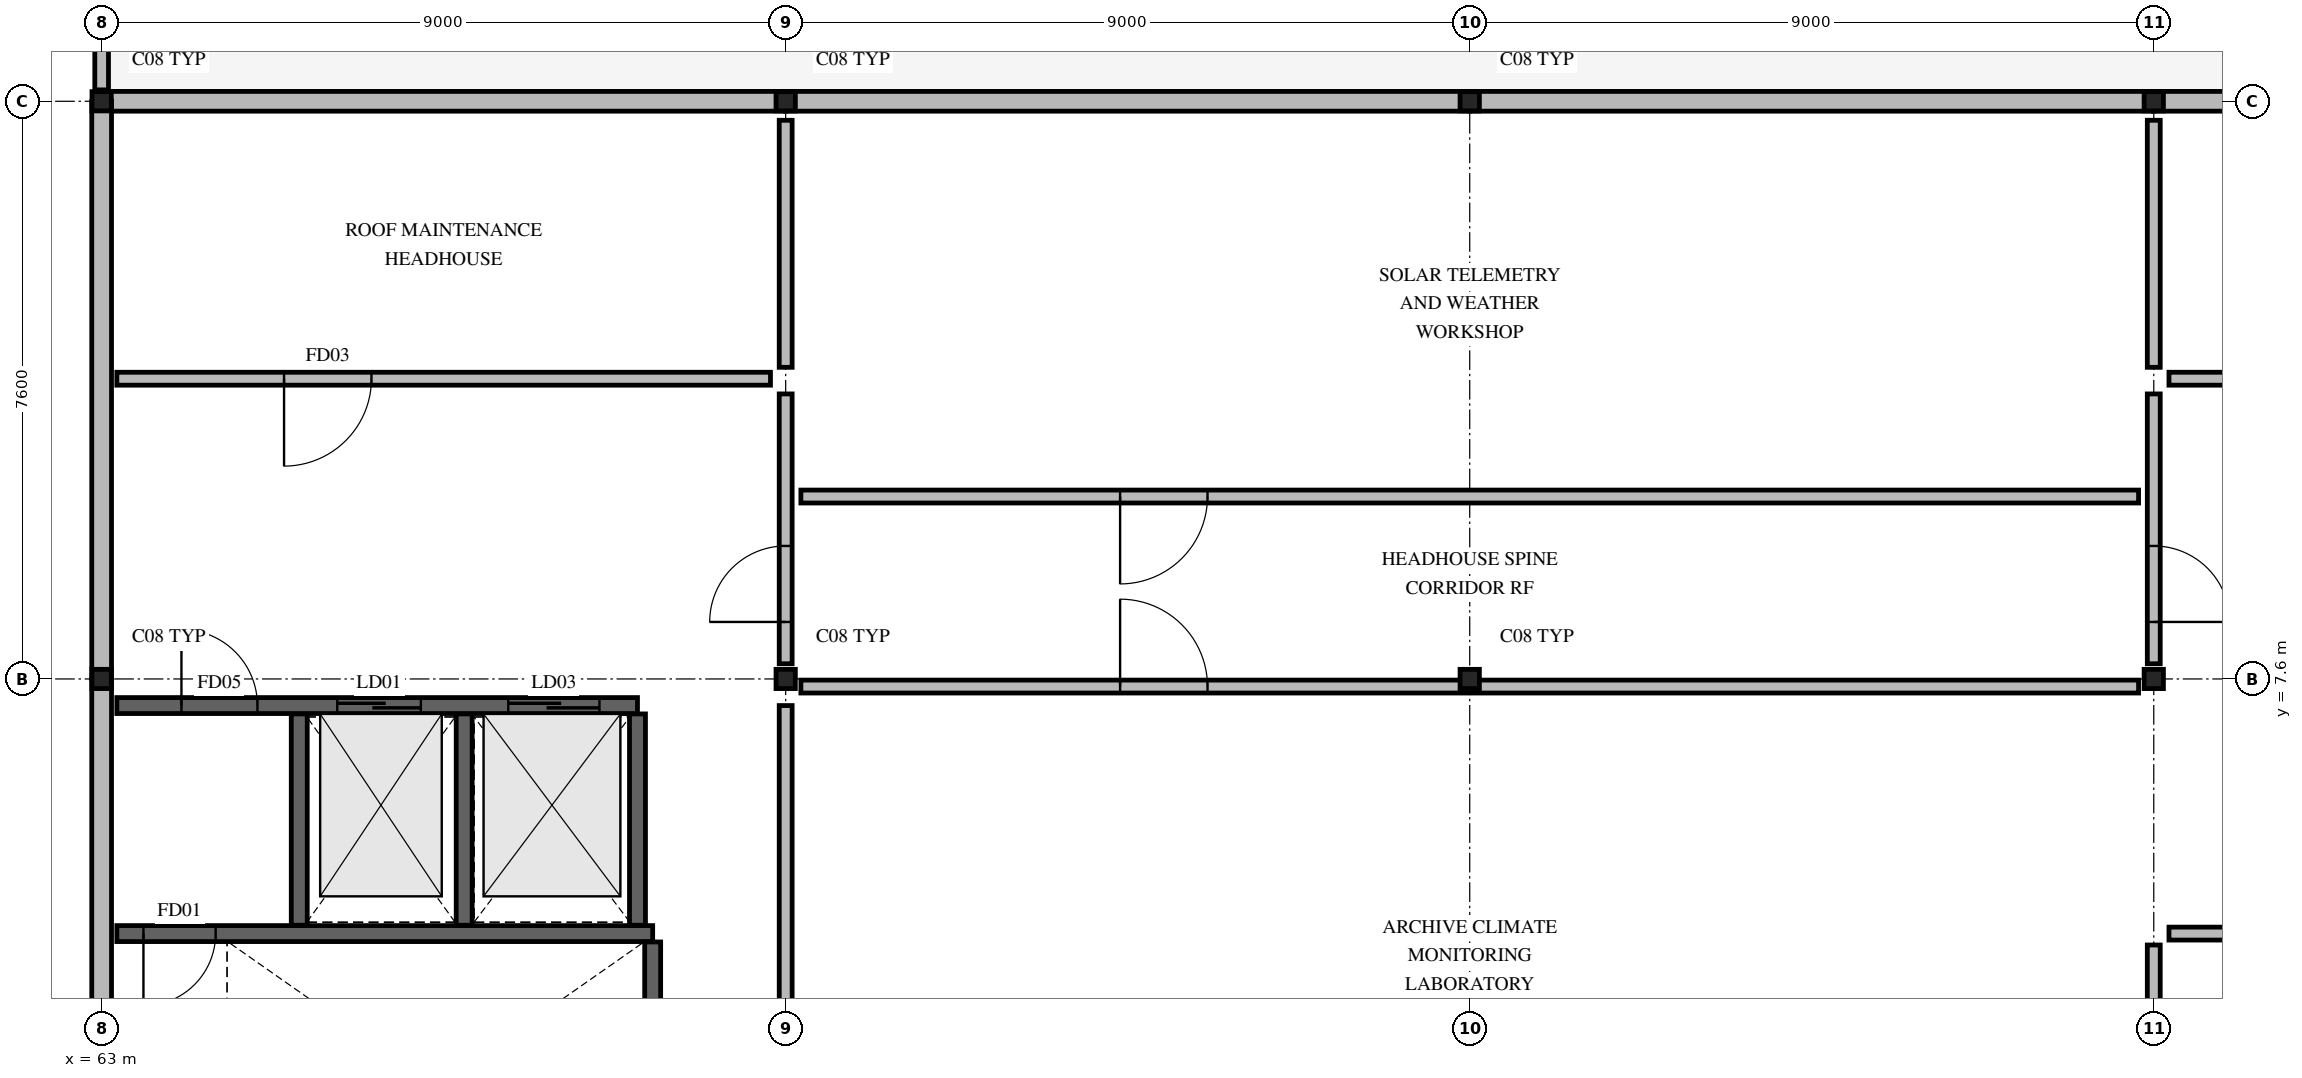
"""IFC4 building model, lengths in metres.
Left out: names, types, materials, properties, quantities, classifications, styles, units other than length and angle.
Written with IfcOpenShell. Run it as: python <this file> out.ifc"""

import sys

from ifc_helpers import new_model, si_unit, direction, frame, frame_2d, origin, origin_2d, place, context, subcontext, project, spatial, rectangle, i_section, extrude, element, fill, save


model = new_model("IFC4")
c1 = context("Model", 3, precision=1e-05, world=origin(), true_north=direction((0.0, 1.0)))
c2 = subcontext(c1, "Body", "Model", "MODEL_VIEW")
j1 = project(units=[si_unit("LENGTHUNIT", "METRE"), si_unit("PLANEANGLEUNIT", "RADIAN")], contexts=[c1])
p1 = place(None, origin())
s1 = spatial("IfcSite", under=j1, at=p1, CompositionType="ELEMENT")
p2 = place(p1, origin())
s2 = spatial("IfcBuilding", under=s1, at=p2, CompositionType="ELEMENT")
p3 = place(p2, frame((0.0, 0.0, 26.64)))
s3 = spatial("IfcBuildingStorey", under=s2, at=p3, CompositionType="ELEMENT", Elevation=26.64)
p4 = place(p3, frame((63.0, 7.6, 0.0), z_axis=(0.0, 0.0, 1.0), x_axis=(1.0, 0.0, 0.0)))
e1 = element("IfcColumn", 1, at=p4, inside=s3, PredefinedType="COLUMN", context=c2, shape_type="SweptSolid", body=[
    extrude(i_section(OverallWidth=0.254, OverallDepth=0.253, WebThickness=0.009, FlangeThickness=0.014, FilletRadius=0.012, at=origin_2d()), origin(), (0.0, 0.0, 1.0), 3.54),
])
p5 = place(p3, frame((63.0, 15.2, 0.0), z_axis=(0.0, 0.0, 1.0), x_axis=(1.0, 0.0, 0.0)))
e2 = element("IfcColumn", 2, at=p5, inside=s3, PredefinedType="COLUMN", context=c2, shape_type="SweptSolid", body=[
    extrude(i_section(OverallWidth=0.254, OverallDepth=0.253, WebThickness=0.009, FlangeThickness=0.014, FilletRadius=0.012, at=origin_2d()), origin(), (0.0, 0.0, 1.0), 4.14),
])
p6 = place(p3, frame((72.0, 7.6, 0.0), z_axis=(0.0, 0.0, 1.0), x_axis=(1.0, 0.0, 0.0)))
e3 = element("IfcColumn", 3, at=p6, inside=s3, PredefinedType="COLUMN", context=c2, shape_type="SweptSolid", body=[
    extrude(i_section(OverallWidth=0.254, OverallDepth=0.253, WebThickness=0.009, FlangeThickness=0.014, FilletRadius=0.012, at=origin_2d()), origin(), (0.0, 0.0, 1.0), 3.54),
])
p7 = place(p3, frame((72.0, 15.2, 0.0), z_axis=(0.0, 0.0, 1.0), x_axis=(1.0, 0.0, 0.0)))
e4 = element("IfcColumn", 4, at=p7, inside=s3, PredefinedType="COLUMN", context=c2, shape_type="SweptSolid", body=[
    extrude(i_section(OverallWidth=0.254, OverallDepth=0.253, WebThickness=0.009, FlangeThickness=0.014, FilletRadius=0.012, at=origin_2d()), origin(), (0.0, 0.0, 1.0), 4.14),
])
p8 = place(p3, frame((81.0, 7.6, 0.0), z_axis=(0.0, 0.0, 1.0), x_axis=(1.0, 0.0, 0.0)))
e5 = element("IfcColumn", 5, at=p8, inside=s3, PredefinedType="COLUMN", context=c2, shape_type="SweptSolid", body=[
    extrude(i_section(OverallWidth=0.254, OverallDepth=0.253, WebThickness=0.009, FlangeThickness=0.014, FilletRadius=0.012, at=origin_2d()), origin(), (0.0, 0.0, 1.0), 3.54),
])
p9 = place(p3, frame((81.0, 15.2, 0.0), z_axis=(0.0, 0.0, 1.0), x_axis=(1.0, 0.0, 0.0)))
e6 = element("IfcColumn", 6, at=p9, inside=s3, PredefinedType="COLUMN", context=c2, shape_type="SweptSolid", body=[
    extrude(i_section(OverallWidth=0.254, OverallDepth=0.253, WebThickness=0.009, FlangeThickness=0.014, FilletRadius=0.012, at=origin_2d()), origin(), (0.0, 0.0, 1.0), 4.14),
])
p10 = place(p3, frame((90.0, 7.6, 0.0), z_axis=(0.0, 0.0, 1.0), x_axis=(1.0, 0.0, 0.0)))
e7 = element("IfcColumn", 7, at=p10, inside=s3, PredefinedType="COLUMN", context=c2, shape_type="SweptSolid", body=[
    extrude(i_section(OverallWidth=0.254, OverallDepth=0.253, WebThickness=0.009, FlangeThickness=0.014, FilletRadius=0.012, at=origin_2d()), origin(), (0.0, 0.0, 1.0), 3.54),
])
p11 = place(p3, frame((90.0, 15.2, 0.0), z_axis=(0.0, 0.0, 1.0), x_axis=(1.0, 0.0, 0.0)))
e8 = element("IfcColumn", 8, at=p11, inside=s3, PredefinedType="COLUMN", context=c2, shape_type="SweptSolid", body=[
    extrude(i_section(OverallWidth=0.254, OverallDepth=0.253, WebThickness=0.009, FlangeThickness=0.014, FilletRadius=0.012, at=origin_2d()), origin(), (0.0, 0.0, 1.0), 4.14),
])
for number, where, z_axis, x_axis in (
    (9, (99.0, 15.2, 0.0), (0.0, 0.0, 1.0), (-1.0, 0.0, 0.0)),
    (10, (90.0, 15.2, 0.0), (0.0, 0.0, 1.0), (-1.0, 0.0, 0.0)),
    (11, (81.0, 15.2, 0.0), (0.0, 0.0, 1.0), (-1.0, 0.0, 0.0)),
    (12, (72.0, 15.2, 0.0), (0.0, 0.0, 1.0), (-1.0, 0.0, 0.0)),
):
    element("IfcWall", number, at=place(p3, frame(where, z_axis=z_axis, x_axis=x_axis)), inside=s3, PredefinedType="STANDARD", context=c2, shape_type="SweptSolid", body=[
        extrude(rectangle(XDim=9.0, YDim=0.26, at=frame_2d((4.5, 0.0))), origin(), (0.0, 0.0, 1.0), 2.44),
    ])
p12 = place(p3, frame((63.0, 15.2, 0.0), z_axis=(0.0, 0.0, 1.0), x_axis=(0.0, -1.0, 0.0)))
e13 = element("IfcWall", 13, at=p12, inside=s3, PredefinedType="STANDARD", context=c2, shape_type="SweptSolid", body=[
    extrude(rectangle(XDim=7.6, YDim=0.26, at=frame_2d((3.8, 0.0))), origin(), (0.0, 0.0, 1.0), 2.44),
])
p13 = place(p3, frame((63.0, 7.6, 0.0), z_axis=(0.0, 0.0, 1.0), x_axis=(0.0, -1.0, 0.0)))
e14 = element("IfcWall", 14, at=p13, inside=s3, PredefinedType="STANDARD", context=c2, shape_type="SweptSolid", body=[
    extrude(rectangle(XDim=7.6, YDim=0.26, at=frame_2d((3.8, 0.0))), origin(), (0.0, 0.0, 1.0), 2.44),
])
p14 = place(p3, frame((63.0, 15.35, 0.0), z_axis=(0.0, 0.0, 1.0), x_axis=(0.0, 1.0, 0.0)))
e15 = element("IfcWall", 15, at=p14, inside=s3, PredefinedType="PARAPET", context=c2, shape_type="SweptSolid", body=[
    extrude(rectangle(XDim=7.45, YDim=0.18, at=frame_2d((3.725, 0.0))), origin(), (0.0, 0.0, 1.0), 1.05),
])
p15 = place(p3, frame((63.2, 4.25, 0.0), z_axis=(0.0, 0.0, 1.0), x_axis=(1.0, 0.0, 0.0)))
e16 = element("IfcWall", 16, at=p15, inside=s3, PredefinedType="SOLIDWALL", context=c2, shape_type="SweptSolid", body=[
    extrude(rectangle(XDim=7.05, YDim=0.21, at=frame_2d((3.525, 0.0))), origin(), (0.0, 0.0, 1.0), 2.44),
])
p16 = place(p15, frame((0.35, 0.0, 0.0)))
e17 = element("IfcOpeningElement", 17, at=p16, cuts=e16, PredefinedType="OPENING", context=c2, shape_type="SweptSolid", body=[
    extrude(rectangle(XDim=0.95, YDim=2.12, at=frame_2d((0.475, 1.06))), frame((0.0, 0.115, 0.0), z_axis=(0.0, -1.0, 0.0), x_axis=(1.0, 0.0, 0.0)), (0.0, 0.0, 1.0), 0.23),
])
p17 = place(p3, frame((70.25, 0.2, 0.0), z_axis=(0.0, 0.0, 1.0), x_axis=(0.0, 1.0, 0.0)))
e18 = element("IfcWall", 18, at=p17, inside=s3, PredefinedType="SOLIDWALL", context=c2, shape_type="SweptSolid", body=[
    extrude(rectangle(XDim=3.94, YDim=0.21, at=frame_2d((1.97, 0.0))), origin(), (0.0, 0.0, 1.0), 2.44),
])
for number, where, z_axis, x_axis in (
    (19, (65.6, 4.36, 0.0), (0.0, 0.0, 1.0), (0.0, 1.0, 0.0)),
    (20, (67.77, 4.36, 0.0), (0.0, 0.0, 1.0), (0.0, 1.0, 0.0)),
    (21, (70.05, 4.36, 0.0), (0.0, 0.0, 1.0), (0.0, 1.0, 0.0)),
):
    element("IfcWall", number, at=place(p3, frame(where, z_axis=z_axis, x_axis=x_axis)), inside=s3, PredefinedType="SOLIDWALL", context=c2, shape_type="SweptSolid", body=[
        extrude(rectangle(XDim=2.78, YDim=0.21, at=frame_2d((1.39, 0.0))), origin(), (0.0, 0.0, 1.0), 2.44),
    ])
p18 = place(p3, frame((63.2, 7.25, 0.0), z_axis=(0.0, 0.0, 1.0), x_axis=(1.0, 0.0, 0.0)))
e22 = element("IfcWall", 22, at=p18, inside=s3, PredefinedType="SOLIDWALL", context=c2, shape_type="SweptSolid", body=[
    extrude(rectangle(XDim=6.85, YDim=0.21, at=frame_2d((3.425, 0.0))), origin(), (0.0, 0.0, 1.0), 2.44),
])
p19 = place(p18, frame((0.85, 0.0, 0.0)))
e23 = element("IfcOpeningElement", 23, at=p19, cuts=e22, PredefinedType="OPENING", context=c2, shape_type="SweptSolid", body=[
    extrude(rectangle(XDim=1.0, YDim=2.15, at=frame_2d((0.5, 1.075))), frame((0.0, 0.115, 0.0), z_axis=(0.0, -1.0, 0.0), x_axis=(1.0, 0.0, 0.0)), (0.0, 0.0, 1.0), 0.23),
])
p20 = place(p18, frame((2.9, 0.0, 0.0)))
e24 = element("IfcOpeningElement", 24, at=p20, cuts=e22, PredefinedType="OPENING", context=c2, shape_type="SweptSolid", body=[
    extrude(rectangle(XDim=1.1, YDim=2.14, at=frame_2d((0.55, 1.07))), frame((0.0, 0.115, 0.0), z_axis=(0.0, -1.0, 0.0), x_axis=(1.0, 0.0, 0.0)), (0.0, 0.0, 1.0), 0.23),
])
p21 = place(p18, frame((5.15, 0.0, 0.0)))
e25 = element("IfcOpeningElement", 25, at=p21, cuts=e22, PredefinedType="OPENING", context=c2, shape_type="SweptSolid", body=[
    extrude(rectangle(XDim=1.2, YDim=2.18, at=frame_2d((0.6, 1.09))), frame((0.0, 0.115, 0.0), z_axis=(0.0, -1.0, 0.0), x_axis=(1.0, 0.0, 0.0)), (0.0, 0.0, 1.0), 0.23),
])
p22 = place(p3, frame((63.2, 11.55, 0.0), z_axis=(0.0, 0.0, 1.0), x_axis=(1.0, 0.0, 0.0)))
e26 = element("IfcWall", 26, at=p22, inside=s3, PredefinedType="PARTITIONING", context=c2, shape_type="SweptSolid", body=[
    extrude(rectangle(XDim=8.6, YDim=0.17, at=frame_2d((4.3, 0.0))), origin(), (0.0, 0.0, 1.0), 2.44),
])
p23 = place(p22, frame((2.2, 0.0, 0.0)))
e27 = element("IfcOpeningElement", 27, at=p23, cuts=e26, PredefinedType="OPENING", context=c2, shape_type="SweptSolid", body=[
    extrude(rectangle(XDim=1.15, YDim=2.15, at=frame_2d((0.575, 1.075))), frame((0.0, 0.095, 0.0), z_axis=(0.0, -1.0, 0.0), x_axis=(1.0, 0.0, 0.0)), (0.0, 0.0, 1.0), 0.19),
])
p24 = place(p3, frame((90.2, 4.25, 0.0), z_axis=(0.0, 0.0, 1.0), x_axis=(1.0, 0.0, 0.0)))
e28 = element("IfcWall", 28, at=p24, inside=s3, PredefinedType="PARTITIONING", context=c2, shape_type="SweptSolid", body=[
    extrude(rectangle(XDim=8.6, YDim=0.17, at=frame_2d((4.3, 0.0))), origin(), (0.0, 0.0, 1.0), 2.44),
])
p25 = place(p24, frame((5.2, 0.0, 0.0)))
e29 = element("IfcOpeningElement", 29, at=p25, cuts=e28, PredefinedType="OPENING", context=c2, shape_type="SweptSolid", body=[
    extrude(rectangle(XDim=1.15, YDim=2.15, at=frame_2d((0.575, 1.075))), frame((0.0, 0.095, 0.0), z_axis=(0.0, -1.0, 0.0), x_axis=(1.0, 0.0, 0.0)), (0.0, 0.0, 1.0), 0.19),
])
p26 = place(p3, frame((90.2, 11.55, 0.0), z_axis=(0.0, 0.0, 1.0), x_axis=(1.0, 0.0, 0.0)))
e30 = element("IfcWall", 30, at=p26, inside=s3, PredefinedType="PARTITIONING", context=c2, shape_type="SweptSolid", body=[
    extrude(rectangle(XDim=8.6, YDim=0.17, at=frame_2d((4.3, 0.0))), origin(), (0.0, 0.0, 1.0), 2.44),
])
p27 = place(p26, frame((2.2, 0.0, 0.0)))
e31 = element("IfcOpeningElement", 31, at=p27, cuts=e30, PredefinedType="OPENING", context=c2, shape_type="SweptSolid", body=[
    extrude(rectangle(XDim=1.15, YDim=2.15, at=frame_2d((0.575, 1.075))), frame((0.0, 0.095, 0.0), z_axis=(0.0, -1.0, 0.0), x_axis=(1.0, 0.0, 0.0)), (0.0, 0.0, 1.0), 0.19),
])
p28 = place(p3, frame((72.0, 0.25, 0.0), z_axis=(0.0, 0.0, 1.0), x_axis=(0.0, 1.0, 0.0)))
e32 = element("IfcWall", 32, at=p28, inside=s3, PredefinedType="PARTITIONING", context=c2, shape_type="SweptSolid", body=[
    extrude(rectangle(XDim=7.0, YDim=0.17, at=frame_2d((3.5, 0.0))), origin(), (0.0, 0.0, 1.0), 2.44),
])
p29 = place(p3, frame((72.0, 7.8, 0.0), z_axis=(0.0, 0.0, 1.0), x_axis=(0.0, 1.0, 0.0)))
e33 = element("IfcWall", 33, at=p29, inside=s3, PredefinedType="PARTITIONING", context=c2, shape_type="SweptSolid", body=[
    extrude(rectangle(XDim=3.55, YDim=0.17, at=frame_2d((1.775, 0.0))), origin(), (0.0, 0.0, 1.0), 2.44),
])
p30 = place(p29, frame((0.55, 0.0, 0.0)))
e34 = element("IfcOpeningElement", 34, at=p30, cuts=e33, PredefinedType="OPENING", context=c2, shape_type="SweptSolid", body=[
    extrude(rectangle(XDim=1.0, YDim=2.15, at=frame_2d((0.5, 1.075))), frame((0.0, 0.095, 0.0), z_axis=(0.0, -1.0, 0.0), x_axis=(1.0, 0.0, 0.0)), (0.0, 0.0, 1.0), 0.19),
])
p31 = place(p3, frame((72.0, 11.7, 0.0), z_axis=(0.0, 0.0, 1.0), x_axis=(0.0, 1.0, 0.0)))
e35 = element("IfcWall", 35, at=p31, inside=s3, PredefinedType="PARTITIONING", context=c2, shape_type="SweptSolid", body=[
    extrude(rectangle(XDim=3.25, YDim=0.17, at=frame_2d((1.625, 0.0))), origin(), (0.0, 0.0, 1.0), 2.44),
])
p32 = place(p3, frame((90.0, 0.25, 0.0), z_axis=(0.0, 0.0, 1.0), x_axis=(0.0, 1.0, 0.0)))
e36 = element("IfcWall", 36, at=p32, inside=s3, PredefinedType="PARTITIONING", context=c2, shape_type="SweptSolid", body=[
    extrude(rectangle(XDim=3.85, YDim=0.17, at=frame_2d((1.925, 0.0))), origin(), (0.0, 0.0, 1.0), 2.44),
])
p33 = place(p3, frame((90.0, 7.8, 0.0), z_axis=(0.0, 0.0, 1.0), x_axis=(0.0, 1.0, 0.0)))
e37 = element("IfcWall", 37, at=p33, inside=s3, PredefinedType="PARTITIONING", context=c2, shape_type="SweptSolid", body=[
    extrude(rectangle(XDim=3.55, YDim=0.17, at=frame_2d((1.775, 0.0))), origin(), (0.0, 0.0, 1.0), 2.44),
])
p34 = place(p33, frame((0.55, 0.0, 0.0)))
e38 = element("IfcOpeningElement", 38, at=p34, cuts=e37, PredefinedType="OPENING", context=c2, shape_type="SweptSolid", body=[
    extrude(rectangle(XDim=1.0, YDim=2.15, at=frame_2d((0.5, 1.075))), frame((0.0, 0.095, 0.0), z_axis=(0.0, -1.0, 0.0), x_axis=(1.0, 0.0, 0.0)), (0.0, 0.0, 1.0), 0.19),
])
p35 = place(p3, frame((90.0, 11.7, 0.0), z_axis=(0.0, 0.0, 1.0), x_axis=(0.0, 1.0, 0.0)))
e39 = element("IfcWall", 39, at=p35, inside=s3, PredefinedType="PARTITIONING", context=c2, shape_type="SweptSolid", body=[
    extrude(rectangle(XDim=3.25, YDim=0.17, at=frame_2d((1.625, 0.0))), origin(), (0.0, 0.0, 1.0), 2.44),
])
p36 = place(p3, frame((72.2, 7.5, 0.0), z_axis=(0.0, 0.0, 1.0), x_axis=(1.0, 0.0, 0.0)))
e40 = element("IfcWall", 40, at=p36, inside=s3, PredefinedType="PARTITIONING", context=c2, shape_type="SweptSolid", body=[
    extrude(rectangle(XDim=17.6, YDim=0.17, at=frame_2d((8.8, 0.0))), origin(), (0.0, 0.0, 1.0), 2.44),
])
p37 = place(p36, frame((4.2, 0.0, 0.0)))
e41 = element("IfcOpeningElement", 41, at=p37, cuts=e40, PredefinedType="OPENING", context=c2, shape_type="SweptSolid", body=[
    extrude(rectangle(XDim=1.15, YDim=2.15, at=frame_2d((0.575, 1.075))), frame((0.0, 0.095, 0.0), z_axis=(0.0, -1.0, 0.0), x_axis=(1.0, 0.0, 0.0)), (0.0, 0.0, 1.0), 0.19),
])
p38 = place(p3, frame((72.2, 10.0, 0.0), z_axis=(0.0, 0.0, 1.0), x_axis=(1.0, 0.0, 0.0)))
e42 = element("IfcWall", 42, at=p38, inside=s3, PredefinedType="PARTITIONING", context=c2, shape_type="SweptSolid", body=[
    extrude(rectangle(XDim=17.6, YDim=0.17, at=frame_2d((8.8, 0.0))), origin(), (0.0, 0.0, 1.0), 2.44),
])
p39 = place(p38, frame((4.2, 0.0, 0.0)))
e43 = element("IfcOpeningElement", 43, at=p39, cuts=e42, PredefinedType="OPENING", context=c2, shape_type="SweptSolid", body=[
    extrude(rectangle(XDim=1.15, YDim=2.15, at=frame_2d((0.575, 1.075))), frame((0.0, 0.095, 0.0), z_axis=(0.0, -1.0, 0.0), x_axis=(1.0, 0.0, 0.0)), (0.0, 0.0, 1.0), 0.19),
])
p40 = place(p16, origin())
e44 = element("IfcDoor", 44, at=p40, inside=s3, OperationType="SINGLE_SWING_RIGHT", PredefinedType="DOOR", context=c2, shape_type="SweptSolid", body=[
    extrude(rectangle(XDim=0.95, YDim=2.12, at=frame_2d((0.475, 1.06))), frame((0.0, 0.025, 0.0), z_axis=(0.0, -1.0, 0.0), x_axis=(1.0, 0.0, 0.0)), (0.0, 0.0, 1.0), 0.05),
])
fill(e17, e44)
p41 = place(p19, origin())
e45 = element("IfcDoor", 45, at=p41, inside=s3, OperationType="SINGLE_SWING_LEFT", PredefinedType="DOOR", context=c2, shape_type="SweptSolid", body=[
    extrude(rectangle(XDim=1.0, YDim=2.15, at=frame_2d((0.5, 1.075))), frame((0.0, 0.025, 0.0), z_axis=(0.0, -1.0, 0.0), x_axis=(1.0, 0.0, 0.0)), (0.0, 0.0, 1.0), 0.05),
])
fill(e23, e45)
p42 = place(p20, origin())
e46 = element("IfcDoor", 46, at=p42, inside=s3, OperationType="SLIDING_TO_LEFT", PredefinedType="DOOR", context=c2, shape_type="SweptSolid", body=[
    extrude(rectangle(XDim=1.1, YDim=2.14, at=frame_2d((0.55, 1.07))), frame((0.0, 0.025, 0.0), z_axis=(0.0, -1.0, 0.0), x_axis=(1.0, 0.0, 0.0)), (0.0, 0.0, 1.0), 0.05),
])
fill(e24, e46)
p43 = place(p21, origin())
e47 = element("IfcDoor", 47, at=p43, inside=s3, OperationType="SLIDING_TO_LEFT", PredefinedType="DOOR", context=c2, shape_type="SweptSolid", body=[
    extrude(rectangle(XDim=1.2, YDim=2.18, at=frame_2d((0.6, 1.09))), frame((0.0, 0.025, 0.0), z_axis=(0.0, -1.0, 0.0), x_axis=(1.0, 0.0, 0.0)), (0.0, 0.0, 1.0), 0.05),
])
fill(e25, e47)
p44 = place(p23, origin())
e48 = element("IfcDoor", 48, at=p44, inside=s3, OperationType="SINGLE_SWING_RIGHT", PredefinedType="DOOR", context=c2, shape_type="SweptSolid", body=[
    extrude(rectangle(XDim=1.15, YDim=2.15, at=frame_2d((0.575, 1.075))), frame((0.0, 0.025, 0.0), z_axis=(0.0, -1.0, 0.0), x_axis=(1.0, 0.0, 0.0)), (0.0, 0.0, 1.0), 0.05),
])
fill(e27, e48)
p45 = place(p30, origin())
e49 = element("IfcDoor", 49, at=p45, inside=s3, OperationType="SINGLE_SWING_LEFT", PredefinedType="DOOR", context=c2, shape_type="SweptSolid", body=[
    extrude(rectangle(XDim=1.0, YDim=2.15, at=frame_2d((0.5, 1.075))), frame((0.0, 0.025, 0.0), z_axis=(0.0, -1.0, 0.0), x_axis=(1.0, 0.0, 0.0)), (0.0, 0.0, 1.0), 0.05),
])
fill(e34, e49)
p46 = place(p34, origin())
e50 = element("IfcDoor", 50, at=p46, inside=s3, OperationType="SINGLE_SWING_RIGHT", PredefinedType="DOOR", context=c2, shape_type="SweptSolid", body=[
    extrude(rectangle(XDim=1.0, YDim=2.15, at=frame_2d((0.5, 1.075))), frame((0.0, 0.025, 0.0), z_axis=(0.0, -1.0, 0.0), x_axis=(1.0, 0.0, 0.0)), (0.0, 0.0, 1.0), 0.05),
])
fill(e38, e50)
p47 = place(p37, origin())
e51 = element("IfcDoor", 51, at=p47, inside=s3, OperationType="SINGLE_SWING_LEFT", PredefinedType="DOOR", context=c2, shape_type="SweptSolid", body=[
    extrude(rectangle(XDim=1.15, YDim=2.15, at=frame_2d((0.575, 1.075))), frame((0.0, 0.025, 0.0), z_axis=(0.0, -1.0, 0.0), x_axis=(1.0, 0.0, 0.0)), (0.0, 0.0, 1.0), 0.05),
])
fill(e41, e51)
p48 = place(p39, origin())
e52 = element("IfcDoor", 52, at=p48, inside=s3, OperationType="SINGLE_SWING_RIGHT", PredefinedType="DOOR", context=c2, shape_type="SweptSolid", body=[
    extrude(rectangle(XDim=1.15, YDim=2.15, at=frame_2d((0.575, 1.075))), frame((0.0, 0.025, 0.0), z_axis=(0.0, -1.0, 0.0), x_axis=(1.0, 0.0, 0.0)), (0.0, 0.0, 1.0), 0.05),
])
fill(e43, e52)
save(model, sys.argv[1])
